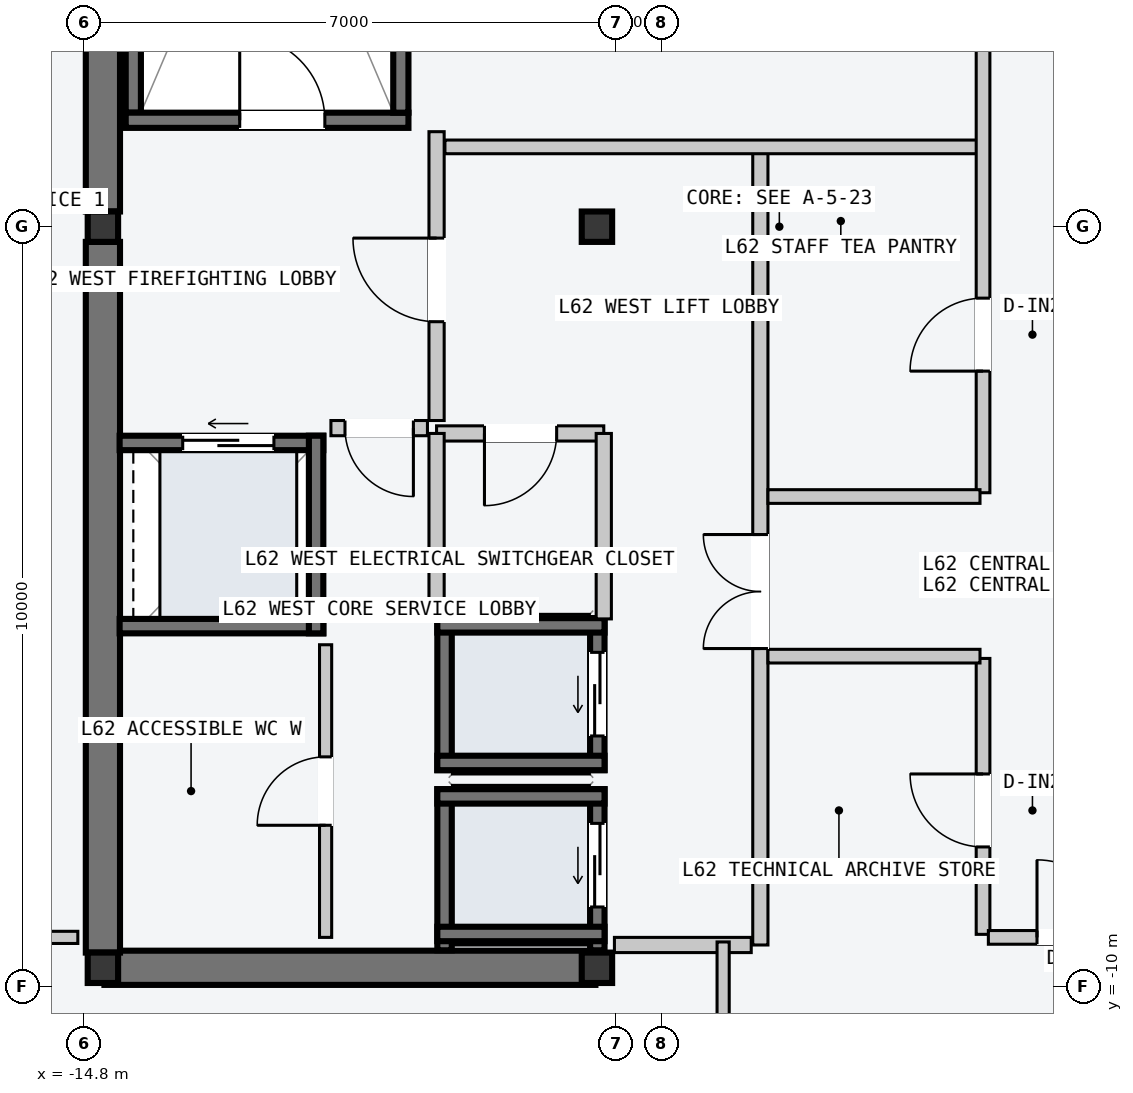
"""IFC4 building model, lengths in metres.
Left out: names, types, materials, properties, quantities, classifications, styles, units other than length and angle.
Written with IfcOpenShell. Run it as: python <this file> out.ifc"""

import sys

from ifc_helpers import new_model, si_unit, direction, frame, frame_2d, origin, origin_2d, place, context, subcontext, project, spatial, rectangle, i_section, extrude, element, fill, save


model = new_model("IFC4")
c1 = context("Model", 3, precision=1e-05, world=origin(), true_north=direction((0.0, 1.0)))
c2 = subcontext(c1, "Body", "Model", "MODEL_VIEW")
j1 = project(units=[si_unit("LENGTHUNIT", "METRE"), si_unit("PLANEANGLEUNIT", "RADIAN")], contexts=[c1])
p1 = place(None, origin())
s1 = spatial("IfcSite", under=j1, at=p1, CompositionType="ELEMENT")
p2 = place(p1, origin())
s2 = spatial("IfcBuilding", under=s1, at=p2, CompositionType="ELEMENT")
p3 = place(p2, frame((0.0, 0.0, 236.4)))
s3 = spatial("IfcBuildingStorey", under=s2, at=p3, CompositionType="ELEMENT", Elevation=236.4)
p4 = place(p3, frame((-14.53, -9.75, -0.2), z_axis=(0.0, 0.0, 1.0), x_axis=(1.0, 0.0, 0.0)))
e1 = element("IfcWall", 1, at=p4, inside=s3, PredefinedType="SHEAR", context=c2, shape_type="SweptSolid", body=[
    extrude(rectangle(XDim=6.46, YDim=0.45, at=frame_2d((3.23, 0.0))), origin(), (0.0, 0.0, 1.0), 3.6),
])
for number, where, z_axis, x_axis in (
    (2, (-14.55, -9.55, -0.2), (0.0, 0.0, 1.0), (0.0, 1.0, 0.0)),
    (3, (-14.55, 0.2, -0.2), (0.0, 0.0, 1.0), (0.0, 1.0, 0.0)),
):
    element("IfcWall", number, at=place(p3, frame(where, z_axis=z_axis, x_axis=x_axis)), inside=s3, PredefinedType="SHEAR", context=c2, shape_type="SweptSolid", body=[
        extrude(rectangle(XDim=9.35, YDim=0.45, at=frame_2d((4.675, 0.0))), origin(), (0.0, 0.0, 1.0), 3.6),
    ])
p5 = place(p3, frame((-14.15, 1.5, -0.2), z_axis=(0.0, 0.0, 1.0), x_axis=(0.0, 1.0, 0.0)))
e4 = element("IfcWall", 4, at=p5, inside=s3, PredefinedType="SOLIDWALL", context=c2, shape_type="SweptSolid", body=[
    extrude(rectangle(XDim=7.8, YDim=0.2, at=frame_2d((3.9, 0.0))), origin(), (0.0, 0.0, 1.0), 3.6),
])
p6 = place(p3, frame((-14.25, 1.4, -0.2), z_axis=(0.0, 0.0, 1.0), x_axis=(1.0, 0.0, 0.0)))
e5 = element("IfcWall", 5, at=p6, inside=s3, PredefinedType="SOLIDWALL", context=c2, shape_type="SweptSolid", body=[
    extrude(rectangle(XDim=3.72, YDim=0.2, at=frame_2d((1.86, 0.0))), origin(), (0.0, 0.0, 1.0), 3.6),
])
p7 = place(p6, frame((1.5, 0.0, 0.2)))
e6 = element("IfcOpeningElement", 6, at=p7, cuts=e5, PredefinedType="OPENING", context=c2, shape_type="SweptSolid", body=[
    extrude(rectangle(XDim=1.12, YDim=2.18, at=frame_2d((0.56, 1.09))), frame((0.0, 0.11, 0.0), z_axis=(0.0, -1.0, 0.0), x_axis=(1.0, 0.0, 0.0)), (0.0, 0.0, 1.0), 0.22),
])
p8 = place(p3, frame((-10.63, 1.5, -0.2), z_axis=(0.0, 0.0, 1.0), x_axis=(0.0, 1.0, 0.0)))
e7 = element("IfcWall", 7, at=p8, inside=s3, PredefinedType="SOLIDWALL", context=c2, shape_type="SweptSolid", body=[
    extrude(rectangle(XDim=7.8, YDim=0.2, at=frame_2d((3.9, 0.0))), origin(), (0.0, 0.0, 1.0), 3.6),
])
for number, where, z_axis, x_axis in (
    (8, (-14.55, -9.75, 0.0), (0.0, 0.0, 1.0), (1.0, 0.0, 0.0)),
    (9, (-14.55, 0.0, 0.0), (0.0, 0.0, 1.0), (1.0, 0.0, 0.0)),
    (10, (-8.05, -9.75, 0.0), (0.0, 0.0, 1.0), (1.0, 0.0, 0.0)),
    (11, (-8.05, 0.0, 0.0), (0.0, 0.0, 1.0), (1.0, 0.0, 0.0)),
):
    element("IfcColumn", number, at=place(p3, frame(where, z_axis=z_axis, x_axis=x_axis)), inside=s3, PredefinedType="COLUMN", context=c2, shape_type="SweptSolid", body=[
        extrude(i_section(OverallWidth=0.4, OverallDepth=0.4, WebThickness=0.013, FlangeThickness=0.021, at=origin_2d()), origin(), (0.0, 0.0, 1.0), 3.6),
    ])
p9 = place(p3, frame((-8.045, -9.52, -0.2), z_axis=(0.0, 0.0, 1.0), x_axis=(0.0, 1.0, 0.0)))
e12 = element("IfcWall", 12, at=p9, inside=s3, PredefinedType="SOLIDWALL", context=c2, shape_type="SweptSolid", body=[
    extrude(rectangle(XDim=2.12, YDim=0.19, at=frame_2d((1.06, 0.0))), origin(), (0.0, 0.0, 1.0), 3.6),
])
p10 = place(p9, frame((0.57, 0.0, 0.2)))
e13 = element("IfcOpeningElement", 13, at=p10, cuts=e12, PredefinedType="OPENING", context=c2, shape_type="SweptSolid", body=[
    extrude(rectangle(XDim=1.1, YDim=2.2, at=frame_2d((0.55, 1.1))), frame((0.0, 0.105, 0.0), z_axis=(0.0, -1.0, 0.0), x_axis=(1.0, 0.0, 0.0)), (0.0, 0.0, 1.0), 0.21),
])
p11 = place(p3, frame((-10.055, -9.52, -0.2), z_axis=(0.0, 0.0, 1.0), x_axis=(0.0, 1.0, 0.0)))
e14 = element("IfcWall", 14, at=p11, inside=s3, PredefinedType="SOLIDWALL", context=c2, shape_type="SweptSolid", body=[
    extrude(rectangle(XDim=2.12, YDim=0.19, at=frame_2d((1.06, 0.0))), origin(), (0.0, 0.0, 1.0), 3.6),
])
for number, where, z_axis, x_axis in (
    (15, (-10.15, -7.495, -0.2), (0.0, 0.0, 1.0), (1.0, 0.0, 0.0)),
    (16, (-10.15, -9.305, -0.2), (0.0, 0.0, 1.0), (1.0, 0.0, 0.0)),
):
    element("IfcWall", number, at=place(p3, frame(where, z_axis=z_axis, x_axis=x_axis)), inside=s3, PredefinedType="SOLIDWALL", context=c2, shape_type="SweptSolid", body=[
        extrude(rectangle(XDim=2.2, YDim=0.19, at=frame_2d((1.1, 0.0))), origin(), (0.0, 0.0, 1.0), 3.6),
    ])
p12 = place(p3, frame((-8.045, -7.15, -0.2), z_axis=(0.0, 0.0, 1.0), x_axis=(0.0, 1.0, 0.0)))
e17 = element("IfcWall", 17, at=p12, inside=s3, PredefinedType="SOLIDWALL", context=c2, shape_type="SweptSolid", body=[
    extrude(rectangle(XDim=2.0, YDim=0.19, at=frame_2d((1.0, 0.0))), origin(), (0.0, 0.0, 1.0), 3.6),
])
p13 = place(p12, frame((0.45, 0.0, 0.2)))
e18 = element("IfcOpeningElement", 18, at=p13, cuts=e17, PredefinedType="OPENING", context=c2, shape_type="SweptSolid", body=[
    extrude(rectangle(XDim=1.1, YDim=2.2, at=frame_2d((0.55, 1.1))), frame((0.0, 0.105, 0.0), z_axis=(0.0, -1.0, 0.0), x_axis=(1.0, 0.0, 0.0)), (0.0, 0.0, 1.0), 0.21),
])
p14 = place(p3, frame((-10.055, -7.15, -0.2), z_axis=(0.0, 0.0, 1.0), x_axis=(0.0, 1.0, 0.0)))
e19 = element("IfcWall", 19, at=p14, inside=s3, PredefinedType="SOLIDWALL", context=c2, shape_type="SweptSolid", body=[
    extrude(rectangle(XDim=2.0, YDim=0.19, at=frame_2d((1.0, 0.0))), origin(), (0.0, 0.0, 1.0), 3.6),
])
for number, where, z_axis, x_axis in (
    (20, (-10.15, -5.245, -0.2), (0.0, 0.0, 1.0), (1.0, 0.0, 0.0)),
    (21, (-10.15, -7.055, -0.2), (0.0, 0.0, 1.0), (1.0, 0.0, 0.0)),
):
    element("IfcWall", number, at=place(p3, frame(where, z_axis=z_axis, x_axis=x_axis)), inside=s3, PredefinedType="SOLIDWALL", context=c2, shape_type="SweptSolid", body=[
        extrude(rectangle(XDim=2.2, YDim=0.19, at=frame_2d((1.1, 0.0))), origin(), (0.0, 0.0, 1.0), 3.6),
    ])
p15 = place(p3, frame((-14.33, -2.845, -0.2), z_axis=(0.0, 0.0, 1.0), x_axis=(1.0, 0.0, 0.0)))
e22 = element("IfcWall", 22, at=p15, inside=s3, PredefinedType="SOLIDWALL", context=c2, shape_type="SweptSolid", body=[
    extrude(rectangle(XDim=2.68, YDim=0.19, at=frame_2d((1.34, 0.0))), origin(), (0.0, 0.0, 1.0), 3.6),
])
p16 = place(p15, frame((0.83, 0.0, 0.2)))
e23 = element("IfcOpeningElement", 23, at=p16, cuts=e22, PredefinedType="OPENING", context=c2, shape_type="SweptSolid", body=[
    extrude(rectangle(XDim=1.2, YDim=2.2, at=frame_2d((0.6, 1.1))), frame((0.0, 0.105, 0.0), z_axis=(0.0, -1.0, 0.0), x_axis=(1.0, 0.0, 0.0)), (0.0, 0.0, 1.0), 0.21),
])
p17 = place(p3, frame((-14.33, -5.255, -0.2), z_axis=(0.0, 0.0, 1.0), x_axis=(1.0, 0.0, 0.0)))
e24 = element("IfcWall", 24, at=p17, inside=s3, PredefinedType="SOLIDWALL", context=c2, shape_type="SweptSolid", body=[
    extrude(rectangle(XDim=2.68, YDim=0.19, at=frame_2d((1.34, 0.0))), origin(), (0.0, 0.0, 1.0), 3.6),
])
p18 = place(p3, frame((-11.745, -5.35, -0.2), z_axis=(0.0, 0.0, 1.0), x_axis=(0.0, 1.0, 0.0)))
e25 = element("IfcWall", 25, at=p18, inside=s3, PredefinedType="SOLIDWALL", context=c2, shape_type="SweptSolid", body=[
    extrude(rectangle(XDim=2.6, YDim=0.19, at=frame_2d((1.3, 0.0))), origin(), (0.0, 0.0, 1.0), 3.6),
])
p19 = place(p3, frame((-5.9, -9.45, 0.0), z_axis=(0.0, 0.0, 1.0), x_axis=(0.0, 1.0, 0.0)))
e26 = element("IfcWall", 26, at=p19, inside=s3, PredefinedType="PARTITIONING", context=c2, shape_type="SweptSolid", body=[
    extrude(rectangle(XDim=10.5, YDim=0.2, at=frame_2d((5.25, 0.0))), origin(), (0.0, 0.0, 1.0), 3.4),
])
p20 = place(p19, frame((3.9, 0.0, 0.0)))
e27 = element("IfcOpeningElement", 27, at=p20, cuts=e26, PredefinedType="OPENING", context=c2, shape_type="SweptSolid", body=[
    extrude(rectangle(XDim=1.5, YDim=2.2, at=frame_2d((0.75, 1.1))), frame((0.0, 0.11, 0.0), z_axis=(0.0, -1.0, 0.0), x_axis=(1.0, 0.0, 0.0)), (0.0, 0.0, 1.0), 0.22),
])
p21 = place(p3, frame((-6.02, -9.45, 0.0), z_axis=(0.0, 0.0, 1.0), x_axis=(-1.0, 0.0, 0.0)))
e28 = element("IfcWall", 28, at=p21, inside=s3, PredefinedType="PARTITIONING", context=c2, shape_type="SweptSolid", body=[
    extrude(rectangle(XDim=1.8, YDim=0.2, at=frame_2d((0.9, 0.0))), origin(), (0.0, 0.0, 1.0), 3.4),
])
p22 = place(p3, frame((-10.16, -2.55, 0.0), z_axis=(0.0, 0.0, 1.0), x_axis=(0.0, 1.0, 0.0)))
e29 = element("IfcWall", 29, at=p22, inside=s3, PredefinedType="PARTITIONING", context=c2, shape_type="SweptSolid", body=[
    extrude(rectangle(XDim=3.8, YDim=0.2, at=frame_2d((1.9, 0.0))), origin(), (0.0, 0.0, 1.0), 3.4),
])
p23 = place(p22, frame((1.3, 0.0, 0.0)))
e30 = element("IfcOpeningElement", 30, at=p23, cuts=e29, PredefinedType="OPENING", context=c2, shape_type="SweptSolid", body=[
    extrude(rectangle(XDim=1.1, YDim=2.15, at=frame_2d((0.55, 1.075))), frame((0.0, 0.11, 0.0), z_axis=(0.0, -1.0, 0.0), x_axis=(1.0, 0.0, 0.0)), (0.0, 0.0, 1.0), 0.22),
])
p24 = place(p3, frame((-10.28, -2.65, 0.0), z_axis=(0.0, 0.0, 1.0), x_axis=(-1.0, 0.0, 0.0)))
e31 = element("IfcWall", 31, at=p24, inside=s3, PredefinedType="PARTITIONING", context=c2, shape_type="SweptSolid", body=[
    extrude(rectangle(XDim=1.27, YDim=0.2, at=frame_2d((0.635, 0.0))), origin(), (0.0, 0.0, 1.0), 3.4),
])
p25 = place(p24, frame((0.185, 0.0, 0.0)))
e32 = element("IfcOpeningElement", 32, at=p25, cuts=e31, PredefinedType="OPENING", context=c2, shape_type="SweptSolid", body=[
    extrude(rectangle(XDim=0.9, YDim=2.15, at=frame_2d((0.45, 1.075))), frame((0.0, 0.11, 0.0), z_axis=(0.0, -1.0, 0.0), x_axis=(1.0, 0.0, 0.0)), (0.0, 0.0, 1.0), 0.22),
])
p26 = place(p3, frame((-7.96, -2.72, 0.0), z_axis=(0.0, 0.0, 1.0), x_axis=(-1.0, 0.0, 0.0)))
e33 = element("IfcWall", 33, at=p26, inside=s3, PredefinedType="PARTITIONING", context=c2, shape_type="SweptSolid", body=[
    extrude(rectangle(XDim=2.2, YDim=0.2, at=frame_2d((1.1, 0.0))), origin(), (0.0, 0.0, 1.0), 3.4),
])
p27 = place(p26, frame((0.62, 0.0, 0.0)))
e34 = element("IfcOpeningElement", 34, at=p27, cuts=e33, PredefinedType="OPENING", context=c2, shape_type="SweptSolid", body=[
    extrude(rectangle(XDim=0.95, YDim=2.1, at=frame_2d((0.475, 1.05))), frame((0.0, 0.11, 0.0), z_axis=(0.0, -1.0, 0.0), x_axis=(1.0, 0.0, 0.0)), (0.0, 0.0, 1.0), 0.22),
])
for number, where, z_axis, x_axis in (
    (35, (-7.96, -5.16, 0.0), (0.0, 0.0, 1.0), (0.0, 1.0, 0.0)),
    (36, (-10.16, -5.16, 0.0), (0.0, 0.0, 1.0), (0.0, 1.0, 0.0)),
):
    element("IfcWall", number, at=place(p3, frame(where, z_axis=z_axis, x_axis=x_axis)), inside=s3, PredefinedType="PARTITIONING", context=c2, shape_type="SweptSolid", body=[
        extrude(rectangle(XDim=2.44, YDim=0.2, at=frame_2d((1.22, 0.0))), origin(), (0.0, 0.0, 1.0), 3.4),
    ])
p28 = place(p3, frame((-11.62, -9.35, 0.0), z_axis=(0.0, 0.0, 1.0), x_axis=(0.0, 1.0, 0.0)))
e37 = element("IfcWall", 37, at=p28, inside=s3, PredefinedType="PARTITIONING", context=c2, shape_type="SweptSolid", body=[
    extrude(rectangle(XDim=3.85, YDim=0.16, at=frame_2d((1.925, 0.0))), origin(), (0.0, 0.0, 1.0), 3.4),
])
p29 = place(p28, frame((1.475, 0.0, 0.0)))
e38 = element("IfcOpeningElement", 38, at=p29, cuts=e37, PredefinedType="OPENING", context=c2, shape_type="SweptSolid", body=[
    extrude(rectangle(XDim=0.9, YDim=2.15, at=frame_2d((0.45, 1.075))), frame((0.0, 0.09, 0.0), z_axis=(0.0, -1.0, 0.0), x_axis=(1.0, 0.0, 0.0)), (0.0, 0.0, 1.0), 0.18),
])
p30 = place(p3, frame((-10.05, 1.05, 0.0), z_axis=(0.0, 0.0, 1.0), x_axis=(1.0, 0.0, 0.0)))
e39 = element("IfcWall", 39, at=p30, inside=s3, PredefinedType="PARTITIONING", context=c2, shape_type="SweptSolid", body=[
    extrude(rectangle(XDim=7.04, YDim=0.18, at=frame_2d((3.52, 0.0))), origin(), (0.0, 0.0, 1.0), 3.4),
])
p31 = place(p3, frame((-2.97, -3.5, 0.0), z_axis=(0.0, 0.0, 1.0), x_axis=(0.0, 1.0, 0.0)))
e40 = element("IfcWall", 40, at=p31, inside=s3, PredefinedType="PARTITIONING", context=c2, shape_type="SweptSolid", body=[
    extrude(rectangle(XDim=13.67, YDim=0.18, at=frame_2d((6.835, 0.0))), origin(), (0.0, 0.0, 1.0), 3.4),
])
p32 = place(p31, frame((6.1, 0.0, 0.0)))
e41 = element("IfcOpeningElement", 41, at=p32, cuts=e40, PredefinedType="OPENING", context=c2, shape_type="SweptSolid", body=[
    extrude(rectangle(XDim=1.24, YDim=2.24, at=frame_2d((0.62, 1.12))), frame((0.0, 0.1, 0.0), z_axis=(0.0, -1.0, 0.0), x_axis=(1.0, 0.0, 0.0)), (0.0, 0.0, 1.0), 0.2),
])
p33 = place(p31, frame((1.6, 0.0, 0.0)))
e42 = element("IfcOpeningElement", 42, at=p33, cuts=e40, PredefinedType="OPENING", context=c2, shape_type="SweptSolid", body=[
    extrude(rectangle(XDim=0.96, YDim=2.18, at=frame_2d((0.48, 1.09))), frame((0.0, 0.1, 0.0), z_axis=(0.0, -1.0, 0.0), x_axis=(1.0, 0.0, 0.0)), (0.0, 0.0, 1.0), 0.2),
])
p34 = place(p3, frame((-5.8, -3.55, 0.0), z_axis=(0.0, 0.0, 1.0), x_axis=(1.0, 0.0, 0.0)))
e43 = element("IfcWall", 43, at=p34, inside=s3, PredefinedType="PARTITIONING", context=c2, shape_type="SweptSolid", body=[
    extrude(rectangle(XDim=2.79, YDim=0.18, at=frame_2d((1.395, 0.0))), origin(), (0.0, 0.0, 1.0), 3.4),
])
p35 = place(p3, frame((-2.97, -9.31, 0.0), z_axis=(0.0, 0.0, 1.0), x_axis=(0.0, 1.0, 0.0)))
e44 = element("IfcWall", 44, at=p35, inside=s3, PredefinedType="PARTITIONING", context=c2, shape_type="SweptSolid", body=[
    extrude(rectangle(XDim=3.63, YDim=0.18, at=frame_2d((1.815, 0.0))), origin(), (0.0, 0.0, 1.0), 3.4),
])
p36 = place(p35, frame((1.15, 0.0, 0.0)))
e45 = element("IfcOpeningElement", 45, at=p36, cuts=e44, PredefinedType="OPENING", context=c2, shape_type="SweptSolid", body=[
    extrude(rectangle(XDim=0.96, YDim=2.18, at=frame_2d((0.48, 1.09))), frame((0.0, 0.1, 0.0), z_axis=(0.0, -1.0, 0.0), x_axis=(1.0, 0.0, 0.0)), (0.0, 0.0, 1.0), 0.2),
])
p37 = place(p3, frame((-5.8, -5.65, 0.0), z_axis=(0.0, 0.0, 1.0), x_axis=(1.0, 0.0, 0.0)))
e46 = element("IfcWall", 46, at=p37, inside=s3, PredefinedType="PARTITIONING", context=c2, shape_type="SweptSolid", body=[
    extrude(rectangle(XDim=2.79, YDim=0.18, at=frame_2d((1.395, 0.0))), origin(), (0.0, 0.0, 1.0), 3.4),
])
p38 = place(p3, frame((-6.39, -17.56, 0.0), z_axis=(0.0, 0.0, 1.0), x_axis=(0.0, 1.0, 0.0)))
e47 = element("IfcWall", 47, at=p38, inside=s3, PredefinedType="PARTITIONING", context=c2, shape_type="SweptSolid", body=[
    extrude(rectangle(XDim=8.15, YDim=0.16, at=frame_2d((4.075, 0.0))), origin(), (0.0, 0.0, 1.0), 3.4),
])
p39 = place(p38, frame((1.05, 0.0, 0.0)))
e48 = element("IfcOpeningElement", 48, at=p39, cuts=e47, PredefinedType="OPENING", context=c2, shape_type="SweptSolid", body=[
    extrude(rectangle(XDim=0.96, YDim=2.18, at=frame_2d((0.48, 1.09))), frame((0.0, 0.09, 0.0), z_axis=(0.0, -1.0, 0.0), x_axis=(1.0, 0.0, 0.0)), (0.0, 0.0, 1.0), 0.18),
])
p40 = place(p3, frame((-2.9, -9.35, 0.0), z_axis=(0.0, 0.0, 1.0), x_axis=(1.0, 0.0, 0.0)))
e49 = element("IfcWall", 49, at=p40, inside=s3, PredefinedType="PARTITIONING", context=c2, shape_type="SweptSolid", body=[
    extrude(rectangle(XDim=2.3, YDim=0.18, at=frame_2d((1.15, 0.0))), origin(), (0.0, 0.0, 1.0), 3.4),
])
p41 = place(p40, frame((0.64, 0.0, 0.0)))
e50 = element("IfcOpeningElement", 50, at=p41, cuts=e49, PredefinedType="OPENING", context=c2, shape_type="SweptSolid", body=[
    extrude(rectangle(XDim=1.02, YDim=2.2, at=frame_2d((0.51, 1.1))), frame((0.0, 0.1, 0.0), z_axis=(0.0, -1.0, 0.0), x_axis=(1.0, 0.0, 0.0)), (0.0, 0.0, 1.0), 0.2),
])
p42 = place(p3, frame((-18.56, -9.35, 0.0), z_axis=(0.0, 0.0, 1.0), x_axis=(1.0, 0.0, 0.0)))
e51 = element("IfcWall", 51, at=p42, inside=s3, PredefinedType="PARTITIONING", context=c2, shape_type="SweptSolid", body=[
    extrude(rectangle(XDim=3.68, YDim=0.16, at=frame_2d((1.84, 0.0))), origin(), (0.0, 0.0, 1.0), 3.4),
])
p43 = place(p42, frame((1.36, 0.0, 0.0)))
e52 = element("IfcOpeningElement", 52, at=p43, cuts=e51, PredefinedType="OPENING", context=c2, shape_type="SweptSolid", body=[
    extrude(rectangle(XDim=0.96, YDim=2.18, at=frame_2d((0.48, 1.09))), frame((0.0, 0.09, 0.0), z_axis=(0.0, -1.0, 0.0), x_axis=(1.0, 0.0, 0.0)), (0.0, 0.0, 1.0), 0.18),
])
p44 = place(p7, origin())
e53 = element("IfcDoor", 53, at=p44, inside=s3, OperationType="SINGLE_SWING_LEFT", PredefinedType="DOOR", context=c2, shape_type="SweptSolid", body=[
    extrude(rectangle(XDim=1.12, YDim=2.18, at=frame_2d((0.56, 1.09))), frame((0.0, 0.025, 0.0), z_axis=(0.0, -1.0, 0.0), x_axis=(1.0, 0.0, 0.0)), (0.0, 0.0, 1.0), 0.05),
])
fill(e6, e53)
p45 = place(p10, origin())
e54 = element("IfcDoor", 54, at=p45, inside=s3, OperationType="SLIDING_TO_LEFT", PredefinedType="DOOR", context=c2, shape_type="SweptSolid", body=[
    extrude(rectangle(XDim=1.1, YDim=2.2, at=frame_2d((0.55, 1.1))), frame((0.0, 0.025, 0.0), z_axis=(0.0, -1.0, 0.0), x_axis=(1.0, 0.0, 0.0)), (0.0, 0.0, 1.0), 0.05),
])
fill(e13, e54)
p46 = place(p13, origin())
e55 = element("IfcDoor", 55, at=p46, inside=s3, OperationType="SLIDING_TO_LEFT", PredefinedType="DOOR", context=c2, shape_type="SweptSolid", body=[
    extrude(rectangle(XDim=1.1, YDim=2.2, at=frame_2d((0.55, 1.1))), frame((0.0, 0.025, 0.0), z_axis=(0.0, -1.0, 0.0), x_axis=(1.0, 0.0, 0.0)), (0.0, 0.0, 1.0), 0.05),
])
fill(e18, e55)
p47 = place(p16, origin())
e56 = element("IfcDoor", 56, at=p47, inside=s3, OperationType="SLIDING_TO_LEFT", PredefinedType="DOOR", context=c2, shape_type="SweptSolid", body=[
    extrude(rectangle(XDim=1.2, YDim=2.2, at=frame_2d((0.6, 1.1))), frame((0.0, 0.025, 0.0), z_axis=(0.0, -1.0, 0.0), x_axis=(1.0, 0.0, 0.0)), (0.0, 0.0, 1.0), 0.05),
])
fill(e23, e56)
p48 = place(p20, origin())
e57 = element("IfcDoor", 57, at=p48, inside=s3, OperationType="DOUBLE_DOOR_SINGLE_SWING", PredefinedType="DOOR", context=c2, shape_type="SweptSolid", body=[
    extrude(rectangle(XDim=1.5, YDim=2.2, at=frame_2d((0.75, 1.1))), frame((0.0, 0.025, 0.0), z_axis=(0.0, -1.0, 0.0), x_axis=(1.0, 0.0, 0.0)), (0.0, 0.0, 1.0), 0.05),
])
fill(e27, e57)
p49 = place(p23, origin())
e58 = element("IfcDoor", 58, at=p49, inside=s3, OperationType="SINGLE_SWING_RIGHT", PredefinedType="DOOR", context=c2, shape_type="SweptSolid", body=[
    extrude(rectangle(XDim=1.1, YDim=2.15, at=frame_2d((0.55, 1.075))), frame((0.0, 0.025, 0.0), z_axis=(0.0, -1.0, 0.0), x_axis=(1.0, 0.0, 0.0)), (0.0, 0.0, 1.0), 0.05),
])
fill(e30, e58)
p50 = place(p25, origin())
e59 = element("IfcDoor", 59, at=p50, inside=s3, OperationType="SINGLE_SWING_LEFT", PredefinedType="DOOR", context=c2, shape_type="SweptSolid", body=[
    extrude(rectangle(XDim=0.9, YDim=2.15, at=frame_2d((0.45, 1.075))), frame((0.0, 0.025, 0.0), z_axis=(0.0, -1.0, 0.0), x_axis=(1.0, 0.0, 0.0)), (0.0, 0.0, 1.0), 0.05),
])
fill(e32, e59)
p51 = place(p27, origin())
e60 = element("IfcDoor", 60, at=p51, inside=s3, OperationType="SINGLE_SWING_RIGHT", PredefinedType="DOOR", context=c2, shape_type="SweptSolid", body=[
    extrude(rectangle(XDim=0.95, YDim=2.1, at=frame_2d((0.475, 1.05))), frame((0.0, 0.025, 0.0), z_axis=(0.0, -1.0, 0.0), x_axis=(1.0, 0.0, 0.0)), (0.0, 0.0, 1.0), 0.05),
])
fill(e34, e60)
p52 = place(p29, origin())
e61 = element("IfcDoor", 61, at=p52, inside=s3, OperationType="SINGLE_SWING_LEFT", PredefinedType="DOOR", context=c2, shape_type="SweptSolid", body=[
    extrude(rectangle(XDim=0.9, YDim=2.15, at=frame_2d((0.45, 1.075))), frame((0.0, 0.025, 0.0), z_axis=(0.0, -1.0, 0.0), x_axis=(1.0, 0.0, 0.0)), (0.0, 0.0, 1.0), 0.05),
])
fill(e38, e61)
p53 = place(p33, origin())
e62 = element("IfcDoor", 62, at=p53, inside=s3, OperationType="SINGLE_SWING_LEFT", PredefinedType="DOOR", context=c2, shape_type="SweptSolid", body=[
    extrude(rectangle(XDim=0.96, YDim=2.18, at=frame_2d((0.48, 1.09))), frame((0.0, 0.025, 0.0), z_axis=(0.0, -1.0, 0.0), x_axis=(1.0, 0.0, 0.0)), (0.0, 0.0, 1.0), 0.05),
])
fill(e42, e62)
p54 = place(p36, origin())
e63 = element("IfcDoor", 63, at=p54, inside=s3, OperationType="SINGLE_SWING_RIGHT", PredefinedType="DOOR", context=c2, shape_type="SweptSolid", body=[
    extrude(rectangle(XDim=0.96, YDim=2.18, at=frame_2d((0.48, 1.09))), frame((0.0, 0.025, 0.0), z_axis=(0.0, -1.0, 0.0), x_axis=(1.0, 0.0, 0.0)), (0.0, 0.0, 1.0), 0.05),
])
fill(e45, e63)
p55 = place(p41, origin())
e64 = element("IfcDoor", 64, at=p55, inside=s3, OperationType="SINGLE_SWING_LEFT", PredefinedType="DOOR", context=c2, shape_type="SweptSolid", body=[
    extrude(rectangle(XDim=1.02, YDim=2.2, at=frame_2d((0.51, 1.1))), frame((0.0, 0.025, 0.0), z_axis=(0.0, -1.0, 0.0), x_axis=(1.0, 0.0, 0.0)), (0.0, 0.0, 1.0), 0.05),
])
fill(e50, e64)
save(model, sys.argv[1])
